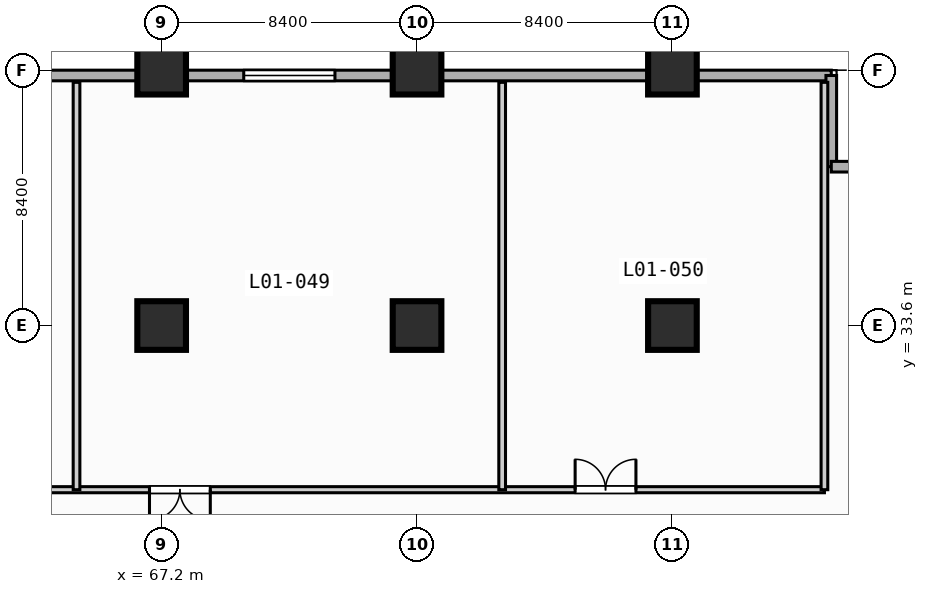
"""IFC4 building model, lengths in metres.
Left out: names, types, materials, properties, quantities, classifications, styles, units other than length and angle.
Written with IfcOpenShell. Run it as: python <this file> out.ifc"""

import sys

from ifc_helpers import new_model, si_unit, direction, frame, frame_2d, origin, origin_2d, place, context, subcontext, project, spatial, rectangle, extrude, element, fill, save


model = new_model("IFC4")
c1 = context("Model", 3, precision=1e-05, world=origin(), true_north=direction((0.0, 1.0)))
c2 = subcontext(c1, "Body", "Model", "MODEL_VIEW")
j1 = project(units=[si_unit("LENGTHUNIT", "METRE"), si_unit("PLANEANGLEUNIT", "RADIAN")], contexts=[c1])
p1 = place(None, origin())
s1 = spatial("IfcSite", under=j1, at=p1, CompositionType="ELEMENT")
p2 = place(p1, origin())
s2 = spatial("IfcBuilding", under=s1, at=p2, CompositionType="ELEMENT")
p3 = place(p2, frame((0.0, 0.0, 6.0)))
s3 = spatial("IfcBuildingStorey", under=s2, at=p3, CompositionType="ELEMENT", Elevation=6.0)
for number, where, z_axis, x_axis in (
    (1, (67.2, 33.6, 0.0), (0.0, 0.0, 1.0), (1.0, 0.0, 0.0)),
    (2, (67.2, 42.0, 0.0), (0.0, 0.0, 1.0), (1.0, 0.0, 0.0)),
    (3, (75.6, 33.6, 0.0), (0.0, 0.0, 1.0), (1.0, 0.0, 0.0)),
    (4, (75.6, 42.0, 0.0), (0.0, 0.0, 1.0), (1.0, 0.0, 0.0)),
    (5, (84.0, 33.6, 0.0), (0.0, 0.0, 1.0), (1.0, 0.0, 0.0)),
    (6, (84.0, 42.0, 0.0), (0.0, 0.0, 1.0), (1.0, 0.0, 0.0)),
):
    element("IfcColumn", number, at=place(p3, frame(where, z_axis=z_axis, x_axis=x_axis)), inside=s3, PredefinedType="COLUMN", context=c2, shape_type="SweptSolid", body=[
        extrude(rectangle(XDim=1.6, YDim=1.6, at=origin_2d()), origin(), (0.0, 0.0, 1.0), 4.8),
    ])
p4 = place(p3, frame((41.825, 41.825, 0.0), z_axis=(0.0, 0.0, 1.0), x_axis=(1.0, 0.0, 0.0)))
e7 = element("IfcWall", 7, at=p4, inside=s3, PredefinedType="STANDARD", context=c2, shape_type="SweptSolid", body=[
    extrude(rectangle(XDim=47.4, YDim=0.35, at=frame_2d((23.7, 0.0))), origin(), (0.0, 0.0, 1.0), 4.45),
])
p5 = place(p4, frame((11.275, 0.0, 0.85)))
e8 = element("IfcOpeningElement", 8, at=p5, cuts=e7, PredefinedType="OPENING", context=c2, shape_type="SweptSolid", body=[
    extrude(rectangle(XDim=3.0, YDim=2.4, at=frame_2d((1.5, 1.2))), frame((0.0, 0.185, 0.0), z_axis=(0.0, -1.0, 0.0), x_axis=(1.0, 0.0, 0.0)), (0.0, 0.0, 1.0), 0.37),
])
p6 = place(p4, frame((28.075, 0.0, 0.85)))
e9 = element("IfcOpeningElement", 9, at=p6, cuts=e7, PredefinedType="OPENING", context=c2, shape_type="SweptSolid", body=[
    extrude(rectangle(XDim=3.0, YDim=2.4, at=frame_2d((1.5, 1.2))), frame((0.0, 0.185, 0.0), z_axis=(0.0, -1.0, 0.0), x_axis=(1.0, 0.0, 0.0)), (0.0, 0.0, 1.0), 0.37),
])
for number, where, z_axis, x_axis in (
    (10, (89.225, 41.825, 0.0), (0.0, 0.0, 1.0), (0.0, -1.0, 0.0)),
    (11, (89.225, 38.825, 0.0), (0.0, 0.0, 1.0), (1.0, 0.0, 0.0)),
):
    element("IfcWall", number, at=place(p3, frame(where, z_axis=z_axis, x_axis=x_axis)), inside=s3, PredefinedType="STANDARD", context=c2, shape_type="SweptSolid", body=[
        extrude(rectangle(XDim=3.0, YDim=0.35, at=frame_2d((1.5, 0.0))), origin(), (0.0, 0.0, 1.0), 4.45),
    ])
p7 = place(p3, frame((50.4, 28.2, 0.0), z_axis=(0.0, 0.0, 1.0), x_axis=(1.0, 0.0, 0.0)))
e12 = element("IfcWall", 12, at=p7, inside=s3, PredefinedType="PARTITIONING", context=c2, shape_type="SweptSolid", body=[
    extrude(rectangle(XDim=38.6, YDim=0.2, at=frame_2d((19.3, 0.0))), origin(), (0.0, 0.0, 1.0), 4.45),
])
p8 = place(p7, frame((2.4, 0.0, 0.0)))
e13 = element("IfcOpeningElement", 13, at=p8, cuts=e12, PredefinedType="OPENING", context=c2, shape_type="SweptSolid", body=[
    extrude(rectangle(XDim=2.0, YDim=2.15, at=frame_2d((1.0, 1.075))), frame((0.0, 0.11, 0.0), z_axis=(0.0, -1.0, 0.0), x_axis=(1.0, 0.0, 0.0)), (0.0, 0.0, 1.0), 0.22),
])
p9 = place(p7, frame((16.4, 0.0, 0.0)))
e14 = element("IfcOpeningElement", 14, at=p9, cuts=e12, PredefinedType="OPENING", context=c2, shape_type="SweptSolid", body=[
    extrude(rectangle(XDim=2.0, YDim=2.15, at=frame_2d((1.0, 1.075))), frame((0.0, 0.11, 0.0), z_axis=(0.0, -1.0, 0.0), x_axis=(1.0, 0.0, 0.0)), (0.0, 0.0, 1.0), 0.22),
])
p10 = place(p7, frame((30.4, 0.0, 0.0)))
e15 = element("IfcOpeningElement", 15, at=p10, cuts=e12, PredefinedType="OPENING", context=c2, shape_type="SweptSolid", body=[
    extrude(rectangle(XDim=2.0, YDim=2.15, at=frame_2d((1.0, 1.075))), frame((0.0, 0.11, 0.0), z_axis=(0.0, -1.0, 0.0), x_axis=(1.0, 0.0, 0.0)), (0.0, 0.0, 1.0), 0.22),
])
for number, where, z_axis, x_axis in (
    (16, (64.4, 28.2, 0.0), (0.0, 0.0, 1.0), (0.0, 1.0, 0.0)),
    (17, (78.4, 28.2, 0.0), (0.0, 0.0, 1.0), (0.0, 1.0, 0.0)),
    (18, (89.0, 28.2, 0.0), (0.0, 0.0, 1.0), (0.0, 1.0, 0.0)),
):
    element("IfcWall", number, at=place(p3, frame(where, z_axis=z_axis, x_axis=x_axis)), inside=s3, PredefinedType="PARTITIONING", context=c2, shape_type="SweptSolid", body=[
        extrude(rectangle(XDim=13.4, YDim=0.22, at=frame_2d((6.7, 0.0))), origin(), (0.0, 0.0, 1.0), 4.45),
    ])
p11 = place(p6, origin())
e19 = element("IfcWindow", 19, at=p11, inside=s3, PartitioningType="SINGLE_PANEL", PredefinedType="WINDOW", context=c2, shape_type="SweptSolid", body=[
    extrude(rectangle(XDim=3.0, YDim=2.4, at=frame_2d((1.5, 1.2))), frame((0.0, 0.03, 0.0), z_axis=(0.0, -1.0, 0.0), x_axis=(1.0, 0.0, 0.0)), (0.0, 0.0, 1.0), 0.06),
])
fill(e9, e19)
p12 = place(p9, origin())
e20 = element("IfcDoor", 20, at=p12, inside=s3, OperationType="SINGLE_SWING_RIGHT", PredefinedType="DOOR", context=c2, shape_type="SweptSolid", body=[
    extrude(rectangle(XDim=2.0, YDim=2.15, at=frame_2d((1.0, 1.075))), frame((0.0, 0.025, 0.0), z_axis=(0.0, -1.0, 0.0), x_axis=(1.0, 0.0, 0.0)), (0.0, 0.0, 1.0), 0.05),
])
fill(e14, e20)
p13 = place(p10, origin())
e21 = element("IfcDoor", 21, at=p13, inside=s3, OperationType="SINGLE_SWING_LEFT", PredefinedType="DOOR", context=c2, shape_type="SweptSolid", body=[
    extrude(rectangle(XDim=2.0, YDim=2.15, at=frame_2d((1.0, 1.075))), frame((0.0, 0.025, 0.0), z_axis=(0.0, -1.0, 0.0), x_axis=(1.0, 0.0, 0.0)), (0.0, 0.0, 1.0), 0.05),
])
fill(e15, e21)
save(model, sys.argv[1])
